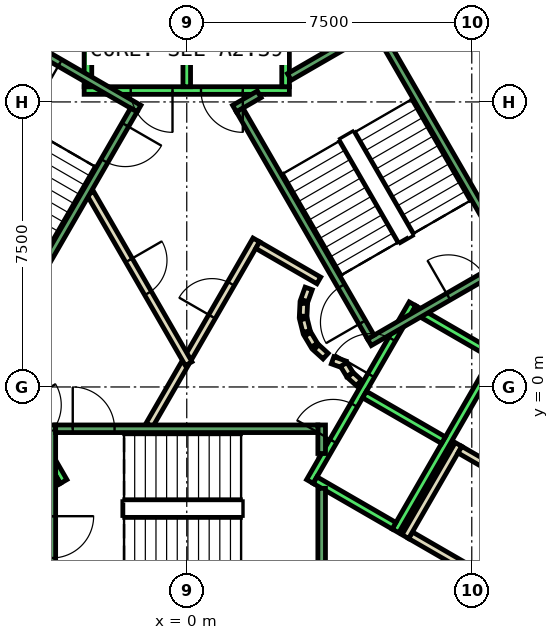
"""IFC4 building model, lengths in metres.
Left out: names, types, materials, properties, quantities, classifications, styles, units other than length and angle.
Written with IfcOpenShell. Run it as: python <this file> out.ifc"""

import sys

from ifc_helpers import new_model, si_unit, direction, frame, frame_2d, origin, place, context, subcontext, project, spatial, polyline, rectangle, outline, extrude, element, fill, save


model = new_model("IFC4")
c1 = context("Model", 3, precision=1e-05, world=origin(), true_north=direction((0.0, 1.0)))
c2 = subcontext(c1, "Body", "Model", "MODEL_VIEW")
j1 = project(units=[si_unit("LENGTHUNIT", "METRE"), si_unit("PLANEANGLEUNIT", "RADIAN")], contexts=[c1])
p1 = place(None, origin())
s1 = spatial("IfcSite", under=j1, at=p1, CompositionType="ELEMENT")
p2 = place(p1, origin())
s2 = spatial("IfcBuilding", under=s1, at=p2, CompositionType="ELEMENT")
p3 = place(p2, frame((0.0, 0.0, 189.8)))
s3 = spatial("IfcBuildingStorey", under=s2, at=p3, CompositionType="ELEMENT", Elevation=189.8)
p4 = place(p3, frame((0.0, 0.0, -0.6)))
e1 = element("IfcWall", 1, at=p4, inside=s3, PredefinedType="SHEAR", context=c2, shape_type="SweptSolid", body=[
    extrude(outline(polyline([(8.084, 11.498), (7.478, 11.148), (12.471, 2.5), (13.279, 2.5), (8.084, 11.498)])), origin(), (0.0, 0.0, 1.0), 4.4),
])
p5 = place(p3, frame((0.0, 0.0, -0.6)))
e2 = element("IfcWall", 2, at=p5, inside=s3, PredefinedType="SHEAR", context=c2, shape_type="SweptSolid", body=[
    extrude(outline(polyline([(6.64, -9.0), (13.279, 2.5), (12.471, 2.5), (6.235, -8.3), (6.64, -9.0)])), origin(), (0.0, 0.0, 1.0), 4.4),
])
p6 = place(p3, frame((8.053, -5.152, 0.0), z_axis=(0.0, 0.0, 1.0), x_axis=(-0.866022959057, 0.500004234368, 0.0)))
e3 = element("IfcWall", 3, at=p6, inside=s3, PredefinedType="PARTITIONING", context=c2, shape_type="SweptSolid", body=[
    extrude(rectangle(XDim=2.5, YDim=0.2, at=frame_2d((1.25, 0.0))), origin(), (0.0, 0.0, 1.0), 3.8),
])
p7 = place(p3, frame((5.751, -3.938, 0.0), z_axis=(0.0, 0.0, 1.0), x_axis=(0.49994636267, 0.866056369097, 0.0)))
e4 = element("IfcWall", 4, at=p7, inside=s3, PredefinedType="PARTITIONING", context=c2, shape_type="SweptSolid", body=[
    extrude(rectangle(XDim=2.8, YDim=0.2, at=frame_2d((1.4, 0.0))), origin(), (0.0, 0.0, 1.0), 3.8),
])
p8 = place(p3, frame((7.188, -1.65, 0.0), z_axis=(0.0, 0.0, 1.0), x_axis=(0.866022959057, -0.500004234368, 0.0)))
e5 = element("IfcWall", 5, at=p8, inside=s3, PredefinedType="PARTITIONING", context=c2, shape_type="SweptSolid", body=[
    extrude(rectangle(XDim=2.5, YDim=0.2, at=frame_2d((1.25, 0.0))), origin(), (0.0, 0.0, 1.0), 3.8),
])
p9 = place(p8, frame((0.75, 0.0, 0.0)))
e6 = element("IfcOpeningElement", 6, at=p9, cuts=e5, PredefinedType="OPENING", context=c2, shape_type="SweptSolid", body=[
    extrude(rectangle(XDim=0.9, YDim=2.1, at=frame_2d((0.45, 1.05))), frame((0.0, 0.11, 0.0), z_axis=(0.0, -1.0, 0.0), x_axis=(1.0, 0.0, 0.0)), (0.0, 0.0, 1.0), 0.22),
])
p10 = place(p3, frame((-0.982, -1.0, 0.0), z_axis=(0.0, 0.0, 1.0), x_axis=(0.50024047865, 0.865886518847, 0.0)))
e7 = element("IfcWall", 7, at=p10, inside=s3, PredefinedType="PARTITIONING", context=c2, shape_type="SweptSolid", body=[
    extrude(rectangle(XDim=1.863, YDim=0.2, at=frame_2d((0.931, 0.0))), origin(), (0.0, 0.0, 1.0), 3.8),
])
p11 = place(p3, frame((0.05, 0.787, 0.0), z_axis=(0.0, 0.0, 1.0), x_axis=(0.499954076797, 0.866051915934, 0.0)))
e8 = element("IfcWall", 8, at=p11, inside=s3, PredefinedType="PARTITIONING", context=c2, shape_type="SweptSolid", body=[
    extrude(rectangle(XDim=3.558, YDim=0.2, at=frame_2d((1.779, 0.0))), origin(), (0.0, 0.0, 1.0), 3.8),
])
p12 = place(p11, frame((1.229, 0.0, 0.0)))
e9 = element("IfcOpeningElement", 9, at=p12, cuts=e8, PredefinedType="OPENING", context=c2, shape_type="SweptSolid", body=[
    extrude(rectangle(XDim=1.0, YDim=2.1, at=frame_2d((0.5, 1.05))), frame((0.0, 0.11, 0.0), z_axis=(0.0, -1.0, 0.0), x_axis=(1.0, 0.0, 0.0)), (0.0, 0.0, 1.0), 0.22),
])
p13 = place(p3, frame((1.866, 3.732, 0.0), z_axis=(0.0, 0.0, 1.0), x_axis=(0.866043361281, -0.499968895414, 0.0)))
e10 = element("IfcWall", 10, at=p13, inside=s3, PredefinedType="PARTITIONING", context=c2, shape_type="SweptSolid", body=[
    extrude(rectangle(XDim=1.858, YDim=0.2, at=frame_2d((0.929, 0.0))), origin(), (0.0, 0.0, 1.0), 3.8),
])
p14 = place(p3, frame((3.208, 2.592, 0.0), z_axis=(0.0, 0.0, 1.0), x_axis=(-0.337388820924, -0.941365382578, 0.0)))
e11 = element("IfcWall", 11, at=p14, inside=s3, PredefinedType="PARTITIONING", context=c2, shape_type="SweptSolid", body=[
    extrude(rectangle(XDim=0.338, YDim=0.2, at=frame_2d((0.169, 0.0))), origin(), (0.0, 0.0, 1.0), 3.8),
])
p15 = place(p3, frame((3.079, 2.199, 0.0), z_axis=(0.0, 0.0, 1.0), x_axis=(-0.047771483479, -0.998858290933, 0.0)))
e12 = element("IfcWall", 12, at=p15, inside=s3, PredefinedType="PARTITIONING", context=c2, shape_type="SweptSolid", body=[
    extrude(rectangle(XDim=0.337, YDim=0.2, at=frame_2d((0.169, 0.0))), origin(), (0.0, 0.0, 1.0), 3.8),
])
p16 = place(p3, frame((3.07, 1.786, 0.0), z_axis=(0.0, 0.0, 1.0), x_axis=(0.242705583207, -0.970099994784, 0.0)))
e13 = element("IfcWall", 13, at=p16, inside=s3, PredefinedType="PARTITIONING", context=c2, shape_type="SweptSolid", body=[
    extrude(rectangle(XDim=0.338, YDim=0.2, at=frame_2d((0.169, 0.0))), origin(), (0.0, 0.0, 1.0), 3.8),
])
for number, where, z_axis, x_axis in (
    (14, (3.182, 1.388, 0.0), (0.0, 0.0, 1.0), (0.512, -0.859, 0.0)),
    (15, (3.404, 1.039, 0.0), (0.0, 0.0, 1.0), (0.74, -0.672, 0.0)),
):
    element("IfcWall", number, at=place(p3, frame(where, z_axis=z_axis, x_axis=x_axis)), inside=s3, PredefinedType="PARTITIONING", context=c2, shape_type="SweptSolid", body=[
        extrude(rectangle(XDim=0.338, YDim=0.2, at=frame_2d((0.169, 0.0))), origin(), (0.0, 0.0, 1.0), 3.8),
    ])
p17 = place(p3, frame((3.838, 0.702, 0.0), z_axis=(0.0, 0.0, 1.0), x_axis=(0.941035081519, -0.338308993895, 0.0)))
e16 = element("IfcWall", 16, at=p17, inside=s3, PredefinedType="PARTITIONING", context=c2, shape_type="SweptSolid", body=[
    extrude(rectangle(XDim=0.337, YDim=0.2, at=frame_2d((0.168, 0.0))), origin(), (0.0, 0.0, 1.0), 3.8),
])
p18 = place(p3, frame((4.132, 0.593, 0.0), z_axis=(0.0, 0.0, 1.0), x_axis=(0.513561617048, -0.858052717201, 0.0)))
e17 = element("IfcWall", 17, at=p18, inside=s3, PredefinedType="PARTITIONING", context=c2, shape_type="SweptSolid", body=[
    extrude(rectangle(XDim=0.308, YDim=0.2, at=frame_2d((0.154, 0.0))), origin(), (0.0, 0.0, 1.0), 3.8),
])
p19 = place(p3, frame((4.301, 0.315, 0.0), z_axis=(0.0, 0.0, 1.0), x_axis=(0.741798017506, -0.670623367639, 0.0)))
e18 = element("IfcWall", 18, at=p19, inside=s3, PredefinedType="PARTITIONING", context=c2, shape_type="SweptSolid", body=[
    extrude(rectangle(XDim=0.309, YDim=0.2, at=frame_2d((0.154, 0.0))), origin(), (0.0, 0.0, 1.0), 3.8),
])
p20 = place(p3, frame((-2.54, 5.1, 0.0), z_axis=(0.0, 0.0, 1.0), x_axis=(0.499925051871, -0.866068670783, 0.0)))
e19 = element("IfcWall", 19, at=p20, inside=s3, PredefinedType="PARTITIONING", context=c2, shape_type="SweptSolid", body=[
    extrude(rectangle(XDim=5.181, YDim=0.2, at=frame_2d((2.59, 0.0))), origin(), (0.0, 0.0, 1.0), 3.8),
])
p21 = place(p20, frame((2.04, 0.0, 0.0)))
e20 = element("IfcOpeningElement", 20, at=p21, cuts=e19, PredefinedType="OPENING", context=c2, shape_type="SweptSolid", body=[
    extrude(rectangle(XDim=1.0, YDim=2.1, at=frame_2d((0.5, 1.05))), frame((0.0, 0.11, 0.0), z_axis=(0.0, -1.0, 0.0), x_axis=(1.0, 0.0, 0.0)), (0.0, 0.0, 1.0), 0.22),
])
p22 = place(p3, frame((2.7, 7.8, 0.0), z_axis=(0.0, 0.0, 1.0), x_axis=(-1.0, 0.0, 0.0)))
e21 = element("IfcWall", 21, at=p22, inside=s3, PredefinedType="STANDARD", context=c2, shape_type="SweptSolid", body=[
    extrude(rectangle(XDim=5.4, YDim=0.2, at=frame_2d((2.7, 0.0))), origin(), (0.0, 0.0, 1.0), 3.8),
])
p23 = place(p22, frame((1.225, 0.0, 0.0)))
e22 = element("IfcOpeningElement", 22, at=p23, cuts=e21, PredefinedType="OPENING", context=c2, shape_type="SweptSolid", body=[
    extrude(rectangle(XDim=1.1, YDim=2.1, at=frame_2d((0.55, 1.05))), frame((0.0, 0.11, 0.0), z_axis=(0.0, -1.0, 0.0), x_axis=(1.0, 0.0, 0.0)), (0.0, 0.0, 1.0), 0.22),
])
p24 = place(p22, frame((3.075, 0.0, 0.0)))
e23 = element("IfcOpeningElement", 23, at=p24, cuts=e21, PredefinedType="OPENING", context=c2, shape_type="SweptSolid", body=[
    extrude(rectangle(XDim=1.1, YDim=2.1, at=frame_2d((0.55, 1.05))), frame((0.0, 0.11, 0.0), z_axis=(0.0, -1.0, 0.0), x_axis=(1.0, 0.0, 0.0)), (0.0, 0.0, 1.0), 0.22),
])
for number, where, z_axis, x_axis in (
    (24, (2.6, 7.9, 0.0), (0.0, 0.0, 1.0), (0.0, 1.0, 0.0)),
    (25, (0.0, 7.9, 0.0), (0.0, 0.0, 1.0), (0.0, 1.0, 0.0)),
    (26, (-2.6, 7.9, 0.0), (0.0, 0.0, 1.0), (0.0, 1.0, 0.0)),
):
    element("IfcWall", number, at=place(p3, frame(where, z_axis=z_axis, x_axis=x_axis)), inside=s3, PredefinedType="STANDARD", context=c2, shape_type="SweptSolid", body=[
        extrude(rectangle(XDim=2.4, YDim=0.2, at=frame_2d((1.2, 0.0))), origin(), (0.0, 0.0, 1.0), 3.8),
    ])
p25 = place(p3, frame((-5.94, 2.188, 0.0), z_axis=(0.0, 0.0, 1.0), x_axis=(0.500034260056, -0.866005622828, 0.0)))
e27 = element("IfcWall", 27, at=p25, inside=s3, PredefinedType="STANDARD", context=c2, shape_type="SweptSolid", body=[
    extrude(rectangle(XDim=5.399, YDim=0.2, at=frame_2d((2.7, 0.0))), origin(), (0.0, 0.0, 1.0), 3.8),
])
p26 = place(p25, frame((3.075, 0.0, 0.0)))
e28 = element("IfcOpeningElement", 28, at=p26, cuts=e27, PredefinedType="OPENING", context=c2, shape_type="SweptSolid", body=[
    extrude(rectangle(XDim=1.1, YDim=2.1, at=frame_2d((0.55, 1.05))), frame((0.0, 0.11, 0.0), z_axis=(0.0, -1.0, 0.0), x_axis=(1.0, 0.0, 0.0)), (0.0, 0.0, 1.0), 0.22),
])
p27 = place(p25, frame((1.225, 0.0, 0.0)))
e29 = element("IfcOpeningElement", 29, at=p27, cuts=e27, PredefinedType="OPENING", context=c2, shape_type="SweptSolid", body=[
    extrude(rectangle(XDim=1.1, YDim=2.1, at=frame_2d((0.55, 1.05))), frame((0.0, 0.11, 0.0), z_axis=(0.0, -1.0, 0.0), x_axis=(1.0, 0.0, 0.0)), (0.0, 0.0, 1.0), 0.22),
])
p28 = place(p3, frame((-3.377, -2.452, 0.0), z_axis=(0.0, 0.0, 1.0), x_axis=(-0.865955154139, -0.50012165622, 0.0)))
e30 = element("IfcWall", 30, at=p28, inside=s3, PredefinedType="STANDARD", context=c2, shape_type="SweptSolid", body=[
    extrude(rectangle(XDim=2.4, YDim=0.2, at=frame_2d((1.2, 0.0))), origin(), (0.0, 0.0, 1.0), 3.8),
])
p29 = place(p3, frame((3.24, -2.488, 0.0), z_axis=(0.0, 0.0, 1.0), x_axis=(0.500034260056, 0.866005622828, 0.0)))
e31 = element("IfcWall", 31, at=p29, inside=s3, PredefinedType="STANDARD", context=c2, shape_type="SweptSolid", body=[
    extrude(rectangle(XDim=5.399, YDim=0.2, at=frame_2d((2.7, 0.0))), origin(), (0.0, 0.0, 1.0), 3.8),
])
p30 = place(p29, frame((3.225, 0.0, 0.0)))
e32 = element("IfcOpeningElement", 32, at=p30, cuts=e31, PredefinedType="OPENING", context=c2, shape_type="SweptSolid", body=[
    extrude(rectangle(XDim=1.1, YDim=2.1, at=frame_2d((0.55, 1.05))), frame((0.0, 0.11, 0.0), z_axis=(0.0, -1.0, 0.0), x_axis=(1.0, 0.0, 0.0)), (0.0, 0.0, 1.0), 0.22),
])
p31 = place(p29, frame((1.225, 0.0, 0.0)))
e33 = element("IfcOpeningElement", 33, at=p31, cuts=e31, PredefinedType="OPENING", context=c2, shape_type="SweptSolid", body=[
    extrude(rectangle(XDim=1.1, YDim=2.1, at=frame_2d((0.55, 1.05))), frame((0.0, 0.11, 0.0), z_axis=(0.0, -1.0, 0.0), x_axis=(1.0, 0.0, 0.0)), (0.0, 0.0, 1.0), 0.22),
])
p32 = place(p3, frame((5.492, -3.788, 0.0), z_axis=(0.0, 0.0, 1.0), x_axis=(0.500034260056, 0.866005622828, 0.0)))
e34 = element("IfcWall", 34, at=p32, inside=s3, PredefinedType="STANDARD", context=c2, shape_type="SweptSolid", body=[
    extrude(rectangle(XDim=5.399, YDim=0.2, at=frame_2d((2.7, 0.0))), origin(), (0.0, 0.0, 1.0), 3.8),
])
p33 = place(p3, frame((3.377, -2.452, 0.0), z_axis=(0.0, 0.0, 1.0), x_axis=(0.865955154139, -0.50012165622, 0.0)))
e35 = element("IfcWall", 35, at=p33, inside=s3, PredefinedType="STANDARD", context=c2, shape_type="SweptSolid", body=[
    extrude(rectangle(XDim=2.4, YDim=0.2, at=frame_2d((1.2, 0.0))), origin(), (0.0, 0.0, 1.0), 3.8),
])
for number, where, z_axis, x_axis in (
    (36, (4.677, -0.2, 0.0), (0.0, 0.0, 1.0), (0.866, -0.5, 0.0)),
    (37, (5.977, 2.052, 0.0), (0.0, 0.0, 1.0), (0.866, -0.5, 0.0)),
):
    element("IfcWall", number, at=place(p3, frame(where, z_axis=z_axis, x_axis=x_axis)), inside=s3, PredefinedType="STANDARD", context=c2, shape_type="SweptSolid", body=[
        extrude(rectangle(XDim=2.399, YDim=0.2, at=frame_2d((1.2, 0.0))), origin(), (0.0, 0.0, 1.0), 3.8),
    ])
p34 = place(p3, frame((-3.55, -1.0, 0.0), z_axis=(0.0, 0.0, 1.0), x_axis=(0.0, -1.0, 0.0)))
e38 = element("IfcWall", 38, at=p34, inside=s3, PredefinedType="STANDARD", context=c2, shape_type="SweptSolid", body=[
    extrude(rectangle(XDim=4.4, YDim=0.2, at=frame_2d((2.2, 0.0))), origin(), (0.0, 0.0, 1.0), 3.8),
])
p35 = place(p34, frame((2.4, 0.0, 0.0)))
e39 = element("IfcOpeningElement", 39, at=p35, cuts=e38, PredefinedType="OPENING", context=c2, shape_type="SweptSolid", body=[
    extrude(rectangle(XDim=1.1, YDim=2.2, at=frame_2d((0.55, 1.1))), frame((0.0, 0.11, 0.0), z_axis=(0.0, -1.0, 0.0), x_axis=(1.0, 0.0, 0.0)), (0.0, 0.0, 1.0), 0.22),
])
p36 = place(p3, frame((3.55, -2.667, 0.0), z_axis=(0.0, 0.0, 1.0), x_axis=(0.0, -1.0, 0.0)))
e40 = element("IfcWall", 40, at=p36, inside=s3, PredefinedType="STANDARD", context=c2, shape_type="SweptSolid", body=[
    extrude(rectangle(XDim=2.733, YDim=0.2, at=frame_2d((1.366, 0.0))), origin(), (0.0, 0.0, 1.0), 3.8),
])
p37 = place(p3, frame((3.55, -1.0, 0.0), z_axis=(0.0, 0.0, 1.0), x_axis=(0.0, -1.0, 0.0)))
e41 = element("IfcWall", 41, at=p37, inside=s3, PredefinedType="STANDARD", context=c2, shape_type="SweptSolid", body=[
    extrude(rectangle(XDim=0.751, YDim=0.2, at=frame_2d((0.375, 0.0))), origin(), (0.0, 0.0, 1.0), 3.8),
])
p38 = place(p3, frame((-3.45, -1.1, 0.0), z_axis=(0.0, 0.0, 1.0), x_axis=(1.0, 0.0, 0.0)))
e42 = element("IfcWall", 42, at=p38, inside=s3, PredefinedType="STANDARD", context=c2, shape_type="SweptSolid", body=[
    extrude(rectangle(XDim=6.9, YDim=0.2, at=frame_2d((3.45, 0.0))), origin(), (0.0, 0.0, 1.0), 3.8),
])
p39 = place(p38, frame((0.45, 0.0, 0.0)))
e43 = element("IfcOpeningElement", 43, at=p39, cuts=e42, PredefinedType="OPENING", context=c2, shape_type="SweptSolid", body=[
    extrude(rectangle(XDim=1.1, YDim=2.2, at=frame_2d((0.55, 1.1))), frame((0.0, 0.11, 0.0), z_axis=(0.0, -1.0, 0.0), x_axis=(1.0, 0.0, 0.0)), (0.0, 0.0, 1.0), 0.22),
])
p40 = place(p3, frame((4.806, 1.176, 0.0), z_axis=(0.0, 0.0, 1.0), x_axis=(0.866059941101, 0.499940174841, 0.0)))
e44 = element("IfcWall", 44, at=p40, inside=s3, PredefinedType="STANDARD", context=c2, shape_type="SweptSolid", body=[
    extrude(rectangle(XDim=4.4, YDim=0.2, at=frame_2d((2.2, 0.0))), origin(), (0.0, 0.0, 1.0), 3.8),
])
p41 = place(p40, frame((2.4, 0.0, 0.0)))
e45 = element("IfcOpeningElement", 45, at=p41, cuts=e44, PredefinedType="OPENING", context=c2, shape_type="SweptSolid", body=[
    extrude(rectangle(XDim=1.1, YDim=2.2, at=frame_2d((0.55, 1.1))), frame((0.0, 0.11, 0.0), z_axis=(0.0, -1.0, 0.0), x_axis=(1.0, 0.0, 0.0)), (0.0, 0.0, 1.0), 0.22),
])
p42 = place(p3, frame((2.7, 8.158, 0.0), z_axis=(0.0, 0.0, 1.0), x_axis=(0.86611865017, 0.499838457731, 0.0)))
e46 = element("IfcWall", 46, at=p42, inside=s3, PredefinedType="STANDARD", context=c2, shape_type="SweptSolid", body=[
    extrude(rectangle(XDim=2.733, YDim=0.2, at=frame_2d((1.366, 0.0))), origin(), (0.0, 0.0, 1.0), 3.8),
])
p43 = place(p3, frame((1.256, 7.324, 0.0), z_axis=(0.0, 0.0, 1.0), x_axis=(0.865915093549, 0.500191014278, 0.0)))
e47 = element("IfcWall", 47, at=p43, inside=s3, PredefinedType="STANDARD", context=c2, shape_type="SweptSolid", body=[
    extrude(rectangle(XDim=0.752, YDim=0.2, at=frame_2d((0.376, 0.0))), origin(), (0.0, 0.0, 1.0), 3.8),
])
p44 = place(p3, frame((4.843, 1.312, 0.0), z_axis=(0.0, 0.0, 1.0), x_axis=(-0.499963383562, 0.866046543262, 0.0)))
e48 = element("IfcWall", 48, at=p44, inside=s3, PredefinedType="STANDARD", context=c2, shape_type="SweptSolid", body=[
    extrude(rectangle(XDim=6.9, YDim=0.2, at=frame_2d((3.45, 0.0))), origin(), (0.0, 0.0, 1.0), 3.8),
])
p45 = place(p44, frame((0.45, 0.0, 0.0)))
e49 = element("IfcOpeningElement", 49, at=p45, cuts=e48, PredefinedType="OPENING", context=c2, shape_type="SweptSolid", body=[
    extrude(rectangle(XDim=1.1, YDim=2.2, at=frame_2d((0.55, 1.1))), frame((0.0, 0.11, 0.0), z_axis=(0.0, -1.0, 0.0), x_axis=(1.0, 0.0, 0.0)), (0.0, 0.0, 1.0), 0.22),
])
p46 = place(p3, frame((8.48, 3.412, 0.0), z_axis=(0.0, 0.0, 1.0), x_axis=(-0.499978703459, 0.866037698999, 0.0)))
e50 = element("IfcWall", 50, at=p46, inside=s3, PredefinedType="STANDARD", context=c2, shape_type="SweptSolid", body=[
    extrude(rectangle(XDim=6.9, YDim=0.2, at=frame_2d((3.45, 0.0))), origin(), (0.0, 0.0, 1.0), 3.8),
])
p47 = place(p3, frame((-1.256, 7.324, 0.0), z_axis=(0.0, 0.0, 1.0), x_axis=(-0.866046073146, 0.499964197906, 0.0)))
e51 = element("IfcWall", 51, at=p47, inside=s3, PredefinedType="STANDARD", context=c2, shape_type="SweptSolid", body=[
    extrude(rectangle(XDim=4.4, YDim=0.2, at=frame_2d((2.2, 0.0))), origin(), (0.0, 0.0, 1.0), 3.8),
])
p48 = place(p47, frame((2.4, 0.0, 0.0)))
e52 = element("IfcOpeningElement", 52, at=p48, cuts=e51, PredefinedType="OPENING", context=c2, shape_type="SweptSolid", body=[
    extrude(rectangle(XDim=1.1, YDim=2.2, at=frame_2d((0.55, 1.1))), frame((0.0, 0.11, 0.0), z_axis=(0.0, -1.0, 0.0), x_axis=(1.0, 0.0, 0.0)), (0.0, 0.0, 1.0), 0.22),
])
p49 = place(p3, frame((-1.393, 7.288, 0.0), z_axis=(0.0, 0.0, 1.0), x_axis=(-0.499963383562, -0.866046543262, 0.0)))
e53 = element("IfcWall", 53, at=p49, inside=s3, PredefinedType="STANDARD", context=c2, shape_type="SweptSolid", body=[
    extrude(rectangle(XDim=6.9, YDim=0.2, at=frame_2d((3.45, 0.0))), origin(), (0.0, 0.0, 1.0), 3.8),
])
p50 = place(p49, frame((0.45, 0.0, 0.0)))
e54 = element("IfcOpeningElement", 54, at=p50, cuts=e53, PredefinedType="OPENING", context=c2, shape_type="SweptSolid", body=[
    extrude(rectangle(XDim=1.1, YDim=2.2, at=frame_2d((0.55, 1.1))), frame((0.0, 0.11, 0.0), z_axis=(0.0, -1.0, 0.0), x_axis=(1.0, 0.0, 0.0)), (0.0, 0.0, 1.0), 0.22),
])
p51 = place(p12, origin())
e55 = element("IfcDoor", 55, at=p51, inside=s3, OperationType="SINGLE_SWING_RIGHT", PredefinedType="DOOR", context=c2, shape_type="SweptSolid", body=[
    extrude(rectangle(XDim=1.0, YDim=2.1, at=frame_2d((0.5, 1.05))), frame((0.0, 0.025, 0.0), z_axis=(0.0, -1.0, 0.0), x_axis=(1.0, 0.0, 0.0)), (0.0, 0.0, 1.0), 0.05),
])
fill(e9, e55)
p52 = place(p21, origin())
e56 = element("IfcDoor", 56, at=p52, inside=s3, OperationType="SINGLE_SWING_RIGHT", PredefinedType="DOOR", context=c2, shape_type="SweptSolid", body=[
    extrude(rectangle(XDim=1.0, YDim=2.1, at=frame_2d((0.5, 1.05))), frame((0.0, 0.025, 0.0), z_axis=(0.0, -1.0, 0.0), x_axis=(1.0, 0.0, 0.0)), (0.0, 0.0, 1.0), 0.05),
])
fill(e20, e56)
p53 = place(p23, origin())
e57 = element("IfcDoor", 57, at=p53, inside=s3, OperationType="SLIDING_TO_LEFT", PredefinedType="DOOR", context=c2, shape_type="SweptSolid", body=[
    extrude(rectangle(XDim=1.1, YDim=2.1, at=frame_2d((0.55, 1.05))), frame((0.0, 0.025, 0.0), z_axis=(0.0, -1.0, 0.0), x_axis=(1.0, 0.0, 0.0)), (0.0, 0.0, 1.0), 0.05),
])
fill(e22, e57)
p54 = place(p24, origin())
e58 = element("IfcDoor", 58, at=p54, inside=s3, OperationType="SLIDING_TO_LEFT", PredefinedType="DOOR", context=c2, shape_type="SweptSolid", body=[
    extrude(rectangle(XDim=1.1, YDim=2.1, at=frame_2d((0.55, 1.05))), frame((0.0, 0.025, 0.0), z_axis=(0.0, -1.0, 0.0), x_axis=(1.0, 0.0, 0.0)), (0.0, 0.0, 1.0), 0.05),
])
fill(e23, e58)
p55 = place(p30, origin())
e59 = element("IfcDoor", 59, at=p55, inside=s3, OperationType="SLIDING_TO_LEFT", PredefinedType="DOOR", context=c2, shape_type="SweptSolid", body=[
    extrude(rectangle(XDim=1.1, YDim=2.1, at=frame_2d((0.55, 1.05))), frame((0.0, 0.025, 0.0), z_axis=(0.0, -1.0, 0.0), x_axis=(1.0, 0.0, 0.0)), (0.0, 0.0, 1.0), 0.05),
])
fill(e32, e59)
p56 = place(p31, origin())
e60 = element("IfcDoor", 60, at=p56, inside=s3, OperationType="SLIDING_TO_LEFT", PredefinedType="DOOR", context=c2, shape_type="SweptSolid", body=[
    extrude(rectangle(XDim=1.1, YDim=2.1, at=frame_2d((0.55, 1.05))), frame((0.0, 0.025, 0.0), z_axis=(0.0, -1.0, 0.0), x_axis=(1.0, 0.0, 0.0)), (0.0, 0.0, 1.0), 0.05),
])
fill(e33, e60)
p57 = place(p39, origin())
e61 = element("IfcDoor", 61, at=p57, inside=s3, OperationType="SINGLE_SWING_LEFT", PredefinedType="DOOR", context=c2, shape_type="SweptSolid", body=[
    extrude(rectangle(XDim=1.1, YDim=2.2, at=frame_2d((0.55, 1.1))), frame((0.0, 0.025, 0.0), z_axis=(0.0, -1.0, 0.0), x_axis=(1.0, 0.0, 0.0)), (0.0, 0.0, 1.0), 0.05),
])
fill(e43, e61)
p58 = place(p35, origin())
e62 = element("IfcDoor", 62, at=p58, inside=s3, OperationType="SINGLE_SWING_LEFT", PredefinedType="DOOR", context=c2, shape_type="SweptSolid", body=[
    extrude(rectangle(XDim=1.1, YDim=2.2, at=frame_2d((0.55, 1.1))), frame((0.0, 0.025, 0.0), z_axis=(0.0, -1.0, 0.0), x_axis=(1.0, 0.0, 0.0)), (0.0, 0.0, 1.0), 0.05),
])
fill(e39, e62)
p59 = place(p45, origin())
e63 = element("IfcDoor", 63, at=p59, inside=s3, OperationType="SINGLE_SWING_LEFT", PredefinedType="DOOR", context=c2, shape_type="SweptSolid", body=[
    extrude(rectangle(XDim=1.1, YDim=2.2, at=frame_2d((0.55, 1.1))), frame((0.0, 0.025, 0.0), z_axis=(0.0, -1.0, 0.0), x_axis=(1.0, 0.0, 0.0)), (0.0, 0.0, 1.0), 0.05),
])
fill(e49, e63)
p60 = place(p41, origin())
e64 = element("IfcDoor", 64, at=p60, inside=s3, OperationType="SINGLE_SWING_LEFT", PredefinedType="DOOR", context=c2, shape_type="SweptSolid", body=[
    extrude(rectangle(XDim=1.1, YDim=2.2, at=frame_2d((0.55, 1.1))), frame((0.0, 0.025, 0.0), z_axis=(0.0, -1.0, 0.0), x_axis=(1.0, 0.0, 0.0)), (0.0, 0.0, 1.0), 0.05),
])
fill(e45, e64)
p61 = place(p50, origin())
e65 = element("IfcDoor", 65, at=p61, inside=s3, OperationType="SINGLE_SWING_LEFT", PredefinedType="DOOR", context=c2, shape_type="SweptSolid", body=[
    extrude(rectangle(XDim=1.1, YDim=2.2, at=frame_2d((0.55, 1.1))), frame((0.0, 0.025, 0.0), z_axis=(0.0, -1.0, 0.0), x_axis=(1.0, 0.0, 0.0)), (0.0, 0.0, 1.0), 0.05),
])
fill(e54, e65)
p62 = place(p48, origin())
e66 = element("IfcDoor", 66, at=p62, inside=s3, OperationType="SINGLE_SWING_LEFT", PredefinedType="DOOR", context=c2, shape_type="SweptSolid", body=[
    extrude(rectangle(XDim=1.1, YDim=2.2, at=frame_2d((0.55, 1.1))), frame((0.0, 0.025, 0.0), z_axis=(0.0, -1.0, 0.0), x_axis=(1.0, 0.0, 0.0)), (0.0, 0.0, 1.0), 0.05),
])
fill(e52, e66)
save(model, sys.argv[1])
